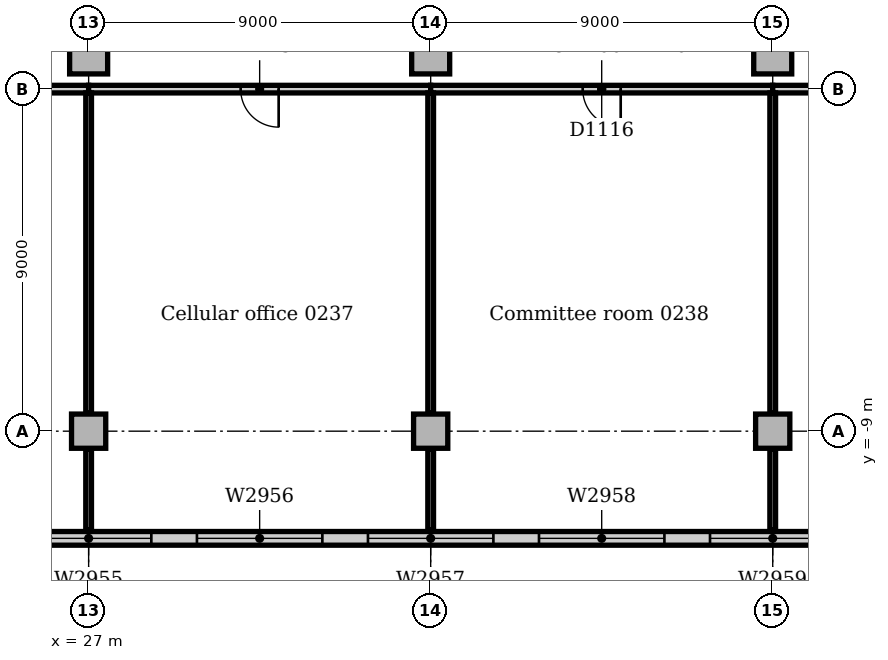
"""IFC4 building model, lengths in metres.
Left out: names, types, materials, properties, quantities, classifications, styles, units other than length and angle.
Written with IfcOpenShell. Run it as: python <this file> out.ifc"""

import sys

from ifc_helpers import new_model, si_unit, direction, frame, frame_2d, origin, origin_2d, place, context, subcontext, project, spatial, rectangle, extrude, element, fill, save


model = new_model("IFC4")
c1 = context("Model", 3, precision=1e-05, world=origin(), true_north=direction((0.0, 1.0)))
c2 = subcontext(c1, "Body", "Model", "MODEL_VIEW")
j1 = project(units=[si_unit("LENGTHUNIT", "METRE"), si_unit("PLANEANGLEUNIT", "RADIAN")], contexts=[c1])
p1 = place(None, origin())
s1 = spatial("IfcSite", under=j1, at=p1, CompositionType="ELEMENT")
p2 = place(p1, origin())
s2 = spatial("IfcBuilding", under=s1, at=p2, CompositionType="ELEMENT")
p3 = place(p2, frame((0.0, 0.0, 11.0)))
s3 = spatial("IfcBuildingStorey", under=s2, at=p3, CompositionType="ELEMENT", Elevation=11.0)
for number, where, z_axis, x_axis in (
    (1, (27.0, 0.9, 0.0), (0.0, 0.0, 1.0), (1.0, 0.0, 0.0)),
    (2, (36.0, 0.9, 0.0), (0.0, 0.0, 1.0), (1.0, 0.0, 0.0)),
    (3, (45.0, 0.9, 0.0), (0.0, 0.0, 1.0), (1.0, 0.0, 0.0)),
):
    element("IfcColumn", number, at=place(p3, frame(where, z_axis=z_axis, x_axis=x_axis)), inside=s3, PredefinedType="COLUMN", context=c2, shape_type="SweptSolid", body=[
        extrude(rectangle(XDim=1.0, YDim=1.0, at=origin_2d()), origin(), (0.0, 0.0, 1.0), 4.7),
    ])
for number, where, z_axis, x_axis in (
    (4, (27.0, -9.0, 0.0), (0.0, 0.0, 1.0), (1.0, 0.0, 0.0)),
    (5, (36.0, -9.0, 0.0), (0.0, 0.0, 1.0), (1.0, 0.0, 0.0)),
    (6, (45.0, -9.0, 0.0), (0.0, 0.0, 1.0), (1.0, 0.0, 0.0)),
):
    element("IfcColumn", number, at=place(p3, frame(where, z_axis=z_axis, x_axis=x_axis)), inside=s3, PredefinedType="COLUMN", context=c2, shape_type="SweptSolid", body=[
        extrude(rectangle(XDim=0.9, YDim=0.9, at=origin_2d()), origin(), (0.0, 0.0, 1.0), 4.7),
    ])
p4 = place(p3, frame((-81.0, -11.82, 0.0), z_axis=(0.0, 0.0, 1.0), x_axis=(1.0, 0.0, 0.0)))
e7 = element("IfcWall", 7, at=p4, inside=s3, PredefinedType="STANDARD", context=c2, shape_type="SweptSolid", body=[
    extrude(rectangle(XDim=144.0, YDim=0.36, at=frame_2d((72.0, 0.0))), origin(), (0.0, 0.0, 1.0), 4.7),
])
p5 = place(p4, frame((2.85, 0.0, 0.9)))
e8 = element("IfcOpeningElement", 8, at=p5, cuts=e7, PredefinedType="OPENING", context=c2, shape_type="SweptSolid", body=[
    extrude(rectangle(XDim=3.3, YDim=2.4, at=frame_2d((1.65, 1.2))), frame((0.0, 0.19, 0.0), z_axis=(0.0, -1.0, 0.0), x_axis=(1.0, 0.0, 0.0)), (0.0, 0.0, 1.0), 0.38),
])
p6 = place(p4, frame((7.35, 0.0, 0.9)))
e9 = element("IfcOpeningElement", 9, at=p6, cuts=e7, PredefinedType="OPENING", context=c2, shape_type="SweptSolid", body=[
    extrude(rectangle(XDim=3.3, YDim=2.4, at=frame_2d((1.65, 1.2))), frame((0.0, 0.19, 0.0), z_axis=(0.0, -1.0, 0.0), x_axis=(1.0, 0.0, 0.0)), (0.0, 0.0, 1.0), 0.38),
])
p7 = place(p4, frame((11.85, 0.0, 0.9)))
e10 = element("IfcOpeningElement", 10, at=p7, cuts=e7, PredefinedType="OPENING", context=c2, shape_type="SweptSolid", body=[
    extrude(rectangle(XDim=3.3, YDim=2.4, at=frame_2d((1.65, 1.2))), frame((0.0, 0.19, 0.0), z_axis=(0.0, -1.0, 0.0), x_axis=(1.0, 0.0, 0.0)), (0.0, 0.0, 1.0), 0.38),
])
p8 = place(p4, frame((16.35, 0.0, 0.9)))
e11 = element("IfcOpeningElement", 11, at=p8, cuts=e7, PredefinedType="OPENING", context=c2, shape_type="SweptSolid", body=[
    extrude(rectangle(XDim=3.3, YDim=2.4, at=frame_2d((1.65, 1.2))), frame((0.0, 0.19, 0.0), z_axis=(0.0, -1.0, 0.0), x_axis=(1.0, 0.0, 0.0)), (0.0, 0.0, 1.0), 0.38),
])
p9 = place(p4, frame((20.85, 0.0, 0.9)))
e12 = element("IfcOpeningElement", 12, at=p9, cuts=e7, PredefinedType="OPENING", context=c2, shape_type="SweptSolid", body=[
    extrude(rectangle(XDim=3.3, YDim=2.4, at=frame_2d((1.65, 1.2))), frame((0.0, 0.19, 0.0), z_axis=(0.0, -1.0, 0.0), x_axis=(1.0, 0.0, 0.0)), (0.0, 0.0, 1.0), 0.38),
])
p10 = place(p4, frame((25.35, 0.0, 0.9)))
e13 = element("IfcOpeningElement", 13, at=p10, cuts=e7, PredefinedType="OPENING", context=c2, shape_type="SweptSolid", body=[
    extrude(rectangle(XDim=3.3, YDim=2.4, at=frame_2d((1.65, 1.2))), frame((0.0, 0.19, 0.0), z_axis=(0.0, -1.0, 0.0), x_axis=(1.0, 0.0, 0.0)), (0.0, 0.0, 1.0), 0.38),
])
p11 = place(p4, frame((29.85, 0.0, 0.9)))
e14 = element("IfcOpeningElement", 14, at=p11, cuts=e7, PredefinedType="OPENING", context=c2, shape_type="SweptSolid", body=[
    extrude(rectangle(XDim=3.3, YDim=2.4, at=frame_2d((1.65, 1.2))), frame((0.0, 0.19, 0.0), z_axis=(0.0, -1.0, 0.0), x_axis=(1.0, 0.0, 0.0)), (0.0, 0.0, 1.0), 0.38),
])
p12 = place(p4, frame((34.35, 0.0, 0.9)))
e15 = element("IfcOpeningElement", 15, at=p12, cuts=e7, PredefinedType="OPENING", context=c2, shape_type="SweptSolid", body=[
    extrude(rectangle(XDim=3.3, YDim=2.4, at=frame_2d((1.65, 1.2))), frame((0.0, 0.19, 0.0), z_axis=(0.0, -1.0, 0.0), x_axis=(1.0, 0.0, 0.0)), (0.0, 0.0, 1.0), 0.38),
])
p13 = place(p4, frame((38.85, 0.0, 0.9)))
e16 = element("IfcOpeningElement", 16, at=p13, cuts=e7, PredefinedType="OPENING", context=c2, shape_type="SweptSolid", body=[
    extrude(rectangle(XDim=3.3, YDim=2.4, at=frame_2d((1.65, 1.2))), frame((0.0, 0.19, 0.0), z_axis=(0.0, -1.0, 0.0), x_axis=(1.0, 0.0, 0.0)), (0.0, 0.0, 1.0), 0.38),
])
p14 = place(p4, frame((43.35, 0.0, 0.9)))
e17 = element("IfcOpeningElement", 17, at=p14, cuts=e7, PredefinedType="OPENING", context=c2, shape_type="SweptSolid", body=[
    extrude(rectangle(XDim=3.3, YDim=2.4, at=frame_2d((1.65, 1.2))), frame((0.0, 0.19, 0.0), z_axis=(0.0, -1.0, 0.0), x_axis=(1.0, 0.0, 0.0)), (0.0, 0.0, 1.0), 0.38),
])
p15 = place(p4, frame((47.85, 0.0, 0.9)))
e18 = element("IfcOpeningElement", 18, at=p15, cuts=e7, PredefinedType="OPENING", context=c2, shape_type="SweptSolid", body=[
    extrude(rectangle(XDim=3.3, YDim=2.4, at=frame_2d((1.65, 1.2))), frame((0.0, 0.19, 0.0), z_axis=(0.0, -1.0, 0.0), x_axis=(1.0, 0.0, 0.0)), (0.0, 0.0, 1.0), 0.38),
])
p16 = place(p4, frame((52.35, 0.0, 0.9)))
e19 = element("IfcOpeningElement", 19, at=p16, cuts=e7, PredefinedType="OPENING", context=c2, shape_type="SweptSolid", body=[
    extrude(rectangle(XDim=3.3, YDim=2.4, at=frame_2d((1.65, 1.2))), frame((0.0, 0.19, 0.0), z_axis=(0.0, -1.0, 0.0), x_axis=(1.0, 0.0, 0.0)), (0.0, 0.0, 1.0), 0.38),
])
p17 = place(p4, frame((56.85, 0.0, 0.9)))
e20 = element("IfcOpeningElement", 20, at=p17, cuts=e7, PredefinedType="OPENING", context=c2, shape_type="SweptSolid", body=[
    extrude(rectangle(XDim=3.3, YDim=2.4, at=frame_2d((1.65, 1.2))), frame((0.0, 0.19, 0.0), z_axis=(0.0, -1.0, 0.0), x_axis=(1.0, 0.0, 0.0)), (0.0, 0.0, 1.0), 0.38),
])
p18 = place(p4, frame((61.35, 0.0, 0.9)))
e21 = element("IfcOpeningElement", 21, at=p18, cuts=e7, PredefinedType="OPENING", context=c2, shape_type="SweptSolid", body=[
    extrude(rectangle(XDim=3.3, YDim=2.4, at=frame_2d((1.65, 1.2))), frame((0.0, 0.19, 0.0), z_axis=(0.0, -1.0, 0.0), x_axis=(1.0, 0.0, 0.0)), (0.0, 0.0, 1.0), 0.38),
])
p19 = place(p4, frame((65.85, 0.0, 0.9)))
e22 = element("IfcOpeningElement", 22, at=p19, cuts=e7, PredefinedType="OPENING", context=c2, shape_type="SweptSolid", body=[
    extrude(rectangle(XDim=3.3, YDim=2.4, at=frame_2d((1.65, 1.2))), frame((0.0, 0.19, 0.0), z_axis=(0.0, -1.0, 0.0), x_axis=(1.0, 0.0, 0.0)), (0.0, 0.0, 1.0), 0.38),
])
p20 = place(p4, frame((70.35, 0.0, 0.9)))
e23 = element("IfcOpeningElement", 23, at=p20, cuts=e7, PredefinedType="OPENING", context=c2, shape_type="SweptSolid", body=[
    extrude(rectangle(XDim=3.3, YDim=2.4, at=frame_2d((1.65, 1.2))), frame((0.0, 0.19, 0.0), z_axis=(0.0, -1.0, 0.0), x_axis=(1.0, 0.0, 0.0)), (0.0, 0.0, 1.0), 0.38),
])
p21 = place(p4, frame((74.85, 0.0, 0.9)))
e24 = element("IfcOpeningElement", 24, at=p21, cuts=e7, PredefinedType="OPENING", context=c2, shape_type="SweptSolid", body=[
    extrude(rectangle(XDim=3.3, YDim=2.4, at=frame_2d((1.65, 1.2))), frame((0.0, 0.19, 0.0), z_axis=(0.0, -1.0, 0.0), x_axis=(1.0, 0.0, 0.0)), (0.0, 0.0, 1.0), 0.38),
])
p22 = place(p4, frame((79.35, 0.0, 0.9)))
e25 = element("IfcOpeningElement", 25, at=p22, cuts=e7, PredefinedType="OPENING", context=c2, shape_type="SweptSolid", body=[
    extrude(rectangle(XDim=3.3, YDim=2.4, at=frame_2d((1.65, 1.2))), frame((0.0, 0.19, 0.0), z_axis=(0.0, -1.0, 0.0), x_axis=(1.0, 0.0, 0.0)), (0.0, 0.0, 1.0), 0.38),
])
p23 = place(p4, frame((83.85, 0.0, 0.9)))
e26 = element("IfcOpeningElement", 26, at=p23, cuts=e7, PredefinedType="OPENING", context=c2, shape_type="SweptSolid", body=[
    extrude(rectangle(XDim=3.3, YDim=2.4, at=frame_2d((1.65, 1.2))), frame((0.0, 0.19, 0.0), z_axis=(0.0, -1.0, 0.0), x_axis=(1.0, 0.0, 0.0)), (0.0, 0.0, 1.0), 0.38),
])
p24 = place(p4, frame((88.35, 0.0, 0.9)))
e27 = element("IfcOpeningElement", 27, at=p24, cuts=e7, PredefinedType="OPENING", context=c2, shape_type="SweptSolid", body=[
    extrude(rectangle(XDim=3.3, YDim=2.4, at=frame_2d((1.65, 1.2))), frame((0.0, 0.19, 0.0), z_axis=(0.0, -1.0, 0.0), x_axis=(1.0, 0.0, 0.0)), (0.0, 0.0, 1.0), 0.38),
])
p25 = place(p4, frame((92.85, 0.0, 0.9)))
e28 = element("IfcOpeningElement", 28, at=p25, cuts=e7, PredefinedType="OPENING", context=c2, shape_type="SweptSolid", body=[
    extrude(rectangle(XDim=3.3, YDim=2.4, at=frame_2d((1.65, 1.2))), frame((0.0, 0.19, 0.0), z_axis=(0.0, -1.0, 0.0), x_axis=(1.0, 0.0, 0.0)), (0.0, 0.0, 1.0), 0.38),
])
p26 = place(p4, frame((97.35, 0.0, 0.9)))
e29 = element("IfcOpeningElement", 29, at=p26, cuts=e7, PredefinedType="OPENING", context=c2, shape_type="SweptSolid", body=[
    extrude(rectangle(XDim=3.3, YDim=2.4, at=frame_2d((1.65, 1.2))), frame((0.0, 0.19, 0.0), z_axis=(0.0, -1.0, 0.0), x_axis=(1.0, 0.0, 0.0)), (0.0, 0.0, 1.0), 0.38),
])
p27 = place(p4, frame((101.85, 0.0, 0.9)))
e30 = element("IfcOpeningElement", 30, at=p27, cuts=e7, PredefinedType="OPENING", context=c2, shape_type="SweptSolid", body=[
    extrude(rectangle(XDim=3.3, YDim=2.4, at=frame_2d((1.65, 1.2))), frame((0.0, 0.19, 0.0), z_axis=(0.0, -1.0, 0.0), x_axis=(1.0, 0.0, 0.0)), (0.0, 0.0, 1.0), 0.38),
])
p28 = place(p4, frame((106.35, 0.0, 0.9)))
e31 = element("IfcOpeningElement", 31, at=p28, cuts=e7, PredefinedType="OPENING", context=c2, shape_type="SweptSolid", body=[
    extrude(rectangle(XDim=3.3, YDim=2.4, at=frame_2d((1.65, 1.2))), frame((0.0, 0.19, 0.0), z_axis=(0.0, -1.0, 0.0), x_axis=(1.0, 0.0, 0.0)), (0.0, 0.0, 1.0), 0.38),
])
p29 = place(p4, frame((110.85, 0.0, 0.9)))
e32 = element("IfcOpeningElement", 32, at=p29, cuts=e7, PredefinedType="OPENING", context=c2, shape_type="SweptSolid", body=[
    extrude(rectangle(XDim=3.3, YDim=2.4, at=frame_2d((1.65, 1.2))), frame((0.0, 0.19, 0.0), z_axis=(0.0, -1.0, 0.0), x_axis=(1.0, 0.0, 0.0)), (0.0, 0.0, 1.0), 0.38),
])
p30 = place(p4, frame((115.35, 0.0, 0.9)))
e33 = element("IfcOpeningElement", 33, at=p30, cuts=e7, PredefinedType="OPENING", context=c2, shape_type="SweptSolid", body=[
    extrude(rectangle(XDim=3.3, YDim=2.4, at=frame_2d((1.65, 1.2))), frame((0.0, 0.19, 0.0), z_axis=(0.0, -1.0, 0.0), x_axis=(1.0, 0.0, 0.0)), (0.0, 0.0, 1.0), 0.38),
])
p31 = place(p4, frame((119.85, 0.0, 0.9)))
e34 = element("IfcOpeningElement", 34, at=p31, cuts=e7, PredefinedType="OPENING", context=c2, shape_type="SweptSolid", body=[
    extrude(rectangle(XDim=3.3, YDim=2.4, at=frame_2d((1.65, 1.2))), frame((0.0, 0.19, 0.0), z_axis=(0.0, -1.0, 0.0), x_axis=(1.0, 0.0, 0.0)), (0.0, 0.0, 1.0), 0.38),
])
p32 = place(p4, frame((124.35, 0.0, 0.9)))
e35 = element("IfcOpeningElement", 35, at=p32, cuts=e7, PredefinedType="OPENING", context=c2, shape_type="SweptSolid", body=[
    extrude(rectangle(XDim=3.3, YDim=2.4, at=frame_2d((1.65, 1.2))), frame((0.0, 0.19, 0.0), z_axis=(0.0, -1.0, 0.0), x_axis=(1.0, 0.0, 0.0)), (0.0, 0.0, 1.0), 0.38),
])
p33 = place(p4, frame((128.85, 0.0, 0.9)))
e36 = element("IfcOpeningElement", 36, at=p33, cuts=e7, PredefinedType="OPENING", context=c2, shape_type="SweptSolid", body=[
    extrude(rectangle(XDim=3.3, YDim=2.4, at=frame_2d((1.65, 1.2))), frame((0.0, 0.19, 0.0), z_axis=(0.0, -1.0, 0.0), x_axis=(1.0, 0.0, 0.0)), (0.0, 0.0, 1.0), 0.38),
])
p34 = place(p4, frame((133.35, 0.0, 0.9)))
e37 = element("IfcOpeningElement", 37, at=p34, cuts=e7, PredefinedType="OPENING", context=c2, shape_type="SweptSolid", body=[
    extrude(rectangle(XDim=3.3, YDim=2.4, at=frame_2d((1.65, 1.2))), frame((0.0, 0.19, 0.0), z_axis=(0.0, -1.0, 0.0), x_axis=(1.0, 0.0, 0.0)), (0.0, 0.0, 1.0), 0.38),
])
p35 = place(p4, frame((137.85, 0.0, 0.9)))
e38 = element("IfcOpeningElement", 38, at=p35, cuts=e7, PredefinedType="OPENING", context=c2, shape_type="SweptSolid", body=[
    extrude(rectangle(XDim=3.3, YDim=2.4, at=frame_2d((1.65, 1.2))), frame((0.0, 0.19, 0.0), z_axis=(0.0, -1.0, 0.0), x_axis=(1.0, 0.0, 0.0)), (0.0, 0.0, 1.0), 0.38),
])
p36 = place(p3, frame((18.0, 0.0, 0.0), z_axis=(0.0, 0.0, 1.0), x_axis=(1.0, 0.0, 0.0)))
e39 = element("IfcWall", 39, at=p36, inside=s3, PredefinedType="PARTITIONING", context=c2, shape_type="SweptSolid", body=[
    extrude(rectangle(XDim=9.0, YDim=0.2, at=frame_2d((4.5, 0.0))), origin(), (0.0, 0.0, 1.0), 4.7),
])
p37 = place(p36, frame((4.0, 0.0, 0.0)))
e40 = element("IfcOpeningElement", 40, at=p37, cuts=e39, PredefinedType="OPENING", context=c2, shape_type="SweptSolid", body=[
    extrude(rectangle(XDim=1.0, YDim=2.1, at=frame_2d((0.5, 1.05))), frame((0.0, 0.11, 0.0), z_axis=(0.0, -1.0, 0.0), x_axis=(1.0, 0.0, 0.0)), (0.0, 0.0, 1.0), 0.22),
])
p38 = place(p3, frame((27.0, 0.0, 0.0), z_axis=(0.0, 0.0, 1.0), x_axis=(1.0, 0.0, 0.0)))
e41 = element("IfcWall", 41, at=p38, inside=s3, PredefinedType="PARTITIONING", context=c2, shape_type="SweptSolid", body=[
    extrude(rectangle(XDim=9.0, YDim=0.2, at=frame_2d((4.5, 0.0))), origin(), (0.0, 0.0, 1.0), 4.7),
])
p39 = place(p38, frame((4.0, 0.0, 0.0)))
e42 = element("IfcOpeningElement", 42, at=p39, cuts=e41, PredefinedType="OPENING", context=c2, shape_type="SweptSolid", body=[
    extrude(rectangle(XDim=1.0, YDim=2.1, at=frame_2d((0.5, 1.05))), frame((0.0, 0.11, 0.0), z_axis=(0.0, -1.0, 0.0), x_axis=(1.0, 0.0, 0.0)), (0.0, 0.0, 1.0), 0.22),
])
p40 = place(p3, frame((36.0, 0.0, 0.0), z_axis=(0.0, 0.0, 1.0), x_axis=(1.0, 0.0, 0.0)))
e43 = element("IfcWall", 43, at=p40, inside=s3, PredefinedType="PARTITIONING", context=c2, shape_type="SweptSolid", body=[
    extrude(rectangle(XDim=9.0, YDim=0.2, at=frame_2d((4.5, 0.0))), origin(), (0.0, 0.0, 1.0), 4.7),
])
p41 = place(p40, frame((4.0, 0.0, 0.0)))
e44 = element("IfcOpeningElement", 44, at=p41, cuts=e43, PredefinedType="OPENING", context=c2, shape_type="SweptSolid", body=[
    extrude(rectangle(XDim=1.0, YDim=2.1, at=frame_2d((0.5, 1.05))), frame((0.0, 0.11, 0.0), z_axis=(0.0, -1.0, 0.0), x_axis=(1.0, 0.0, 0.0)), (0.0, 0.0, 1.0), 0.22),
])
p42 = place(p3, frame((45.0, 0.0, 0.0), z_axis=(0.0, 0.0, 1.0), x_axis=(1.0, 0.0, 0.0)))
e45 = element("IfcWall", 45, at=p42, inside=s3, PredefinedType="PARTITIONING", context=c2, shape_type="SweptSolid", body=[
    extrude(rectangle(XDim=9.0, YDim=0.2, at=frame_2d((4.5, 0.0))), origin(), (0.0, 0.0, 1.0), 4.7),
])
p43 = place(p42, frame((4.6, 0.0, 0.0)))
e46 = element("IfcOpeningElement", 46, at=p43, cuts=e45, PredefinedType="OPENING", context=c2, shape_type="SweptSolid", body=[
    extrude(rectangle(XDim=1.0, YDim=2.1, at=frame_2d((0.5, 1.05))), frame((0.0, 0.11, 0.0), z_axis=(0.0, -1.0, 0.0), x_axis=(1.0, 0.0, 0.0)), (0.0, 0.0, 1.0), 0.22),
])
p44 = place(p3, frame((27.0, -11.6, 0.0), z_axis=(0.0, 0.0, 1.0), x_axis=(0.0, 1.0, 0.0)))
e47 = element("IfcWall", 47, at=p44, inside=s3, PredefinedType="PARTITIONING", context=c2, shape_type="SweptSolid", body=[
    extrude(rectangle(XDim=2.13, YDim=0.15, at=frame_2d((1.065, 0.0))), origin(), (0.0, 0.0, 1.0), 4.7),
])
p45 = place(p3, frame((27.0, -8.53, 0.0), z_axis=(0.0, 0.0, 1.0), x_axis=(0.0, 1.0, 0.0)))
e48 = element("IfcWall", 48, at=p45, inside=s3, PredefinedType="PARTITIONING", context=c2, shape_type="SweptSolid", body=[
    extrude(rectangle(XDim=8.43, YDim=0.15, at=frame_2d((4.215, 0.0))), origin(), (0.0, 0.0, 1.0), 4.7),
])
p46 = place(p3, frame((36.0, -11.6, 0.0), z_axis=(0.0, 0.0, 1.0), x_axis=(0.0, 1.0, 0.0)))
e49 = element("IfcWall", 49, at=p46, inside=s3, PredefinedType="PARTITIONING", context=c2, shape_type="SweptSolid", body=[
    extrude(rectangle(XDim=2.13, YDim=0.15, at=frame_2d((1.065, 0.0))), origin(), (0.0, 0.0, 1.0), 4.7),
])
p47 = place(p3, frame((36.0, -8.53, 0.0), z_axis=(0.0, 0.0, 1.0), x_axis=(0.0, 1.0, 0.0)))
e50 = element("IfcWall", 50, at=p47, inside=s3, PredefinedType="PARTITIONING", context=c2, shape_type="SweptSolid", body=[
    extrude(rectangle(XDim=8.43, YDim=0.15, at=frame_2d((4.215, 0.0))), origin(), (0.0, 0.0, 1.0), 4.7),
])
p48 = place(p3, frame((45.0, -11.6, 0.0), z_axis=(0.0, 0.0, 1.0), x_axis=(0.0, 1.0, 0.0)))
e51 = element("IfcWall", 51, at=p48, inside=s3, PredefinedType="PARTITIONING", context=c2, shape_type="SweptSolid", body=[
    extrude(rectangle(XDim=2.13, YDim=0.15, at=frame_2d((1.065, 0.0))), origin(), (0.0, 0.0, 1.0), 4.7),
])
p49 = place(p3, frame((45.0, -8.53, 0.0), z_axis=(0.0, 0.0, 1.0), x_axis=(0.0, 1.0, 0.0)))
e52 = element("IfcWall", 52, at=p49, inside=s3, PredefinedType="PARTITIONING", context=c2, shape_type="SweptSolid", body=[
    extrude(rectangle(XDim=8.43, YDim=0.15, at=frame_2d((4.215, 0.0))), origin(), (0.0, 0.0, 1.0), 4.7),
])
p50 = place(p28, origin())
e53 = element("IfcWindow", 53, at=p50, inside=s3, PartitioningType="SINGLE_PANEL", PredefinedType="WINDOW", context=c2, shape_type="SweptSolid", body=[
    extrude(rectangle(XDim=3.3, YDim=2.4, at=frame_2d((1.65, 1.2))), frame((0.0, 0.13, 0.0), z_axis=(0.0, -1.0, 0.0), x_axis=(1.0, 0.0, 0.0)), (0.0, 0.0, 1.0), 0.06),
])
fill(e31, e53)
p51 = place(p29, origin())
e54 = element("IfcWindow", 54, at=p51, inside=s3, PartitioningType="SINGLE_PANEL", PredefinedType="WINDOW", context=c2, shape_type="SweptSolid", body=[
    extrude(rectangle(XDim=3.3, YDim=2.4, at=frame_2d((1.65, 1.2))), frame((0.0, 0.13, 0.0), z_axis=(0.0, -1.0, 0.0), x_axis=(1.0, 0.0, 0.0)), (0.0, 0.0, 1.0), 0.06),
])
fill(e32, e54)
p52 = place(p30, origin())
e55 = element("IfcWindow", 55, at=p52, inside=s3, PartitioningType="SINGLE_PANEL", PredefinedType="WINDOW", context=c2, shape_type="SweptSolid", body=[
    extrude(rectangle(XDim=3.3, YDim=2.4, at=frame_2d((1.65, 1.2))), frame((0.0, 0.13, 0.0), z_axis=(0.0, -1.0, 0.0), x_axis=(1.0, 0.0, 0.0)), (0.0, 0.0, 1.0), 0.06),
])
fill(e33, e55)
p53 = place(p31, origin())
e56 = element("IfcWindow", 56, at=p53, inside=s3, PartitioningType="SINGLE_PANEL", PredefinedType="WINDOW", context=c2, shape_type="SweptSolid", body=[
    extrude(rectangle(XDim=3.3, YDim=2.4, at=frame_2d((1.65, 1.2))), frame((0.0, 0.13, 0.0), z_axis=(0.0, -1.0, 0.0), x_axis=(1.0, 0.0, 0.0)), (0.0, 0.0, 1.0), 0.06),
])
fill(e34, e56)
p54 = place(p32, origin())
e57 = element("IfcWindow", 57, at=p54, inside=s3, PartitioningType="SINGLE_PANEL", PredefinedType="WINDOW", context=c2, shape_type="SweptSolid", body=[
    extrude(rectangle(XDim=3.3, YDim=2.4, at=frame_2d((1.65, 1.2))), frame((0.0, 0.13, 0.0), z_axis=(0.0, -1.0, 0.0), x_axis=(1.0, 0.0, 0.0)), (0.0, 0.0, 1.0), 0.06),
])
fill(e35, e57)
p55 = place(p39, frame((1.0, 0.0, 0.0), z_axis=(0.0, 0.0, 1.0), x_axis=(-1.0, 0.0, 0.0)))
e58 = element("IfcDoor", 58, at=p55, inside=s3, OperationType="SINGLE_SWING_LEFT", PredefinedType="DOOR", context=c2, shape_type="SweptSolid", body=[
    extrude(rectangle(XDim=1.0, YDim=2.1, at=frame_2d((0.5, 1.05))), frame((0.0, 0.025, 0.0), z_axis=(0.0, -1.0, 0.0), x_axis=(1.0, 0.0, 0.0)), (0.0, 0.0, 1.0), 0.05),
])
fill(e42, e58)
p56 = place(p41, frame((1.0, 0.0, 0.0), z_axis=(0.0, 0.0, 1.0), x_axis=(-1.0, 0.0, 0.0)))
e59 = element("IfcDoor", 59, at=p56, inside=s3, OperationType="SINGLE_SWING_LEFT", PredefinedType="DOOR", context=c2, shape_type="SweptSolid", body=[
    extrude(rectangle(XDim=1.0, YDim=2.1, at=frame_2d((0.5, 1.05))), frame((0.0, 0.025, 0.0), z_axis=(0.0, -1.0, 0.0), x_axis=(1.0, 0.0, 0.0)), (0.0, 0.0, 1.0), 0.05),
])
fill(e44, e59)
save(model, sys.argv[1])
